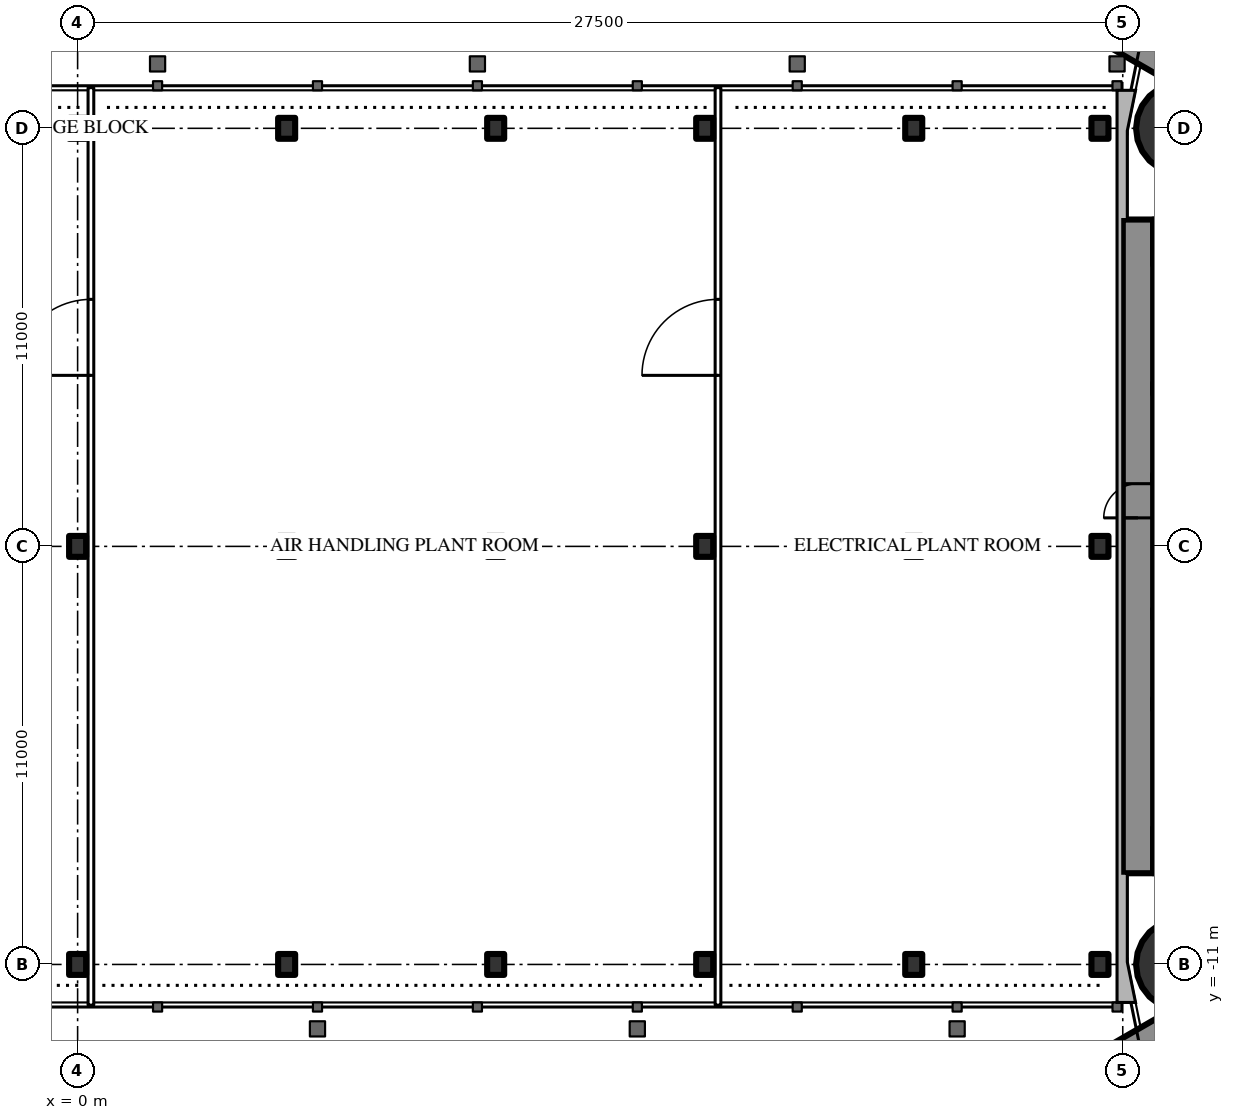
"""IFC4 building model, lengths in metres.
Left out: names, types, materials, properties, quantities, classifications, styles, units other than length and angle.
Written with IfcOpenShell. Run it as: python <this file> out.ifc"""

import sys

from ifc_helpers import new_model, si_unit, direction, frame, frame_2d, origin, origin_2d, place, context, subcontext, project, spatial, rectangle, circle, i_section, extrude, element, fill, save


model = new_model("IFC4")
c1 = context("Model", 3, precision=1e-05, world=origin(), true_north=direction((0.0, 1.0)))
c2 = subcontext(c1, "Body", "Model", "MODEL_VIEW")
j1 = project(units=[si_unit("LENGTHUNIT", "METRE"), si_unit("PLANEANGLEUNIT", "RADIAN")], contexts=[c1])
p1 = place(None, origin())
s1 = spatial("IfcSite", under=j1, at=p1, CompositionType="ELEMENT")
p2 = place(p1, origin())
s2 = spatial("IfcBuilding", under=s1, at=p2, CompositionType="ELEMENT")
p3 = place(p2, frame((0.0, 0.0, 251.9)))
s3 = spatial("IfcBuildingStorey", under=s2, at=p3, CompositionType="ELEMENT", Elevation=251.9)
for number, where, z_axis, x_axis in (
    (1, (29.05, 11.0, 0.0), (0.0, 0.0, 1.0), (1.0, 0.0, 0.0)),
    (2, (29.05, -11.0, 0.0), (0.0, 0.0, 1.0), (1.0, 0.0, 0.0)),
):
    element("IfcColumn", number, at=place(p3, frame(where, z_axis=z_axis, x_axis=x_axis)), inside=s3, PredefinedType="COLUMN", context=c2, shape_type="SweptSolid", body=[
        extrude(circle(Radius=1.2, at=origin_2d()), origin(), (0.0, 0.0, 1.0), 5.4),
    ])
p4 = place(p3, frame((27.9, -8.6, 0.0), z_axis=(0.0, 0.0, 1.0), x_axis=(0.0, 1.0, 0.0)))
e3 = element("IfcWall", 3, at=p4, inside=s3, PredefinedType="SHEAR", context=c2, shape_type="SweptSolid", body=[
    extrude(rectangle(XDim=17.2, YDim=0.8, at=frame_2d((8.6, 0.0))), origin(), (0.0, 0.0, 1.0), 5.4),
])
p5 = place(p4, frame((9.35, 0.0, 0.0)))
e4 = element("IfcOpeningElement", 4, at=p5, cuts=e3, PredefinedType="OPENING", context=c2, shape_type="SweptSolid", body=[
    extrude(rectangle(XDim=0.9, YDim=2.2, at=frame_2d((0.45, 1.1))), frame((0.0, 0.41, 0.0), z_axis=(0.0, -1.0, 0.0), x_axis=(1.0, 0.0, 0.0)), (0.0, 0.0, 1.0), 0.82),
])
p6 = place(p3, frame((28.3, -8.0, 0.0), z_axis=(0.0, 0.0, 1.0), x_axis=(1.0, 0.0, 0.0)))
e5 = element("IfcWall", 5, at=p6, inside=s3, PredefinedType="SHEAR", context=c2, shape_type="SweptSolid", body=[
    extrude(rectangle(XDim=8.4, YDim=1.2, at=frame_2d((4.2, 0.0))), origin(), (0.0, 0.0, 1.0), 5.4),
])
p7 = place(p6, frame((0.25, 0.0, 0.0)))
e6 = element("IfcOpeningElement", 6, at=p7, cuts=e5, PredefinedType="OPENING", context=c2, shape_type="SweptSolid", body=[
    extrude(rectangle(XDim=1.0, YDim=2.2, at=frame_2d((0.5, 1.1))), frame((0.0, 0.61, 0.0), z_axis=(0.0, -1.0, 0.0), x_axis=(1.0, 0.0, 0.0)), (0.0, 0.0, 1.0), 1.22),
])
p8 = place(p3, frame((28.3, 8.0, 0.0), z_axis=(0.0, 0.0, 1.0), x_axis=(1.0, 0.0, 0.0)))
e7 = element("IfcWall", 7, at=p8, inside=s3, PredefinedType="SHEAR", context=c2, shape_type="SweptSolid", body=[
    extrude(rectangle(XDim=8.4, YDim=1.2, at=frame_2d((4.2, 0.0))), origin(), (0.0, 0.0, 1.0), 5.4),
])
p9 = place(p8, frame((0.25, 0.0, 0.0)))
e8 = element("IfcOpeningElement", 8, at=p9, cuts=e7, PredefinedType="OPENING", context=c2, shape_type="SweptSolid", body=[
    extrude(rectangle(XDim=1.0, YDim=2.2, at=frame_2d((0.5, 1.1))), frame((0.0, 0.61, 0.0), z_axis=(0.0, -1.0, 0.0), x_axis=(1.0, 0.0, 0.0)), (0.0, 0.0, 1.0), 1.22),
])
for number, where, z_axis, x_axis in (
    (9, (28.3, -4.15, 0.0), (0.0, 0.0, 1.0), (1.0, 0.0, 0.0)),
    (10, (28.3, 4.15, 0.0), (0.0, 0.0, 1.0), (1.0, 0.0, 0.0)),
):
    element("IfcWall", number, at=place(p3, frame(where, z_axis=z_axis, x_axis=x_axis)), inside=s3, PredefinedType="SHEAR", context=c2, shape_type="SweptSolid", body=[
        extrude(rectangle(XDim=8.4, YDim=0.3, at=frame_2d((4.2, 0.0))), origin(), (0.0, 0.0, 1.0), 5.4),
    ])
for number, where, z_axis, x_axis in (
    (11, (28.3, -1.775, 0.0), (0.0, 0.0, 1.0), (1.0, 0.0, 0.0)),
    (12, (28.3, 1.775, 0.0), (0.0, 0.0, 1.0), (1.0, 0.0, 0.0)),
):
    element("IfcWall", number, at=place(p3, frame(where, z_axis=z_axis, x_axis=x_axis)), inside=s3, PredefinedType="SHEAR", context=c2, shape_type="SweptSolid", body=[
        extrude(rectangle(XDim=2.9, YDim=0.25, at=frame_2d((1.45, 0.0))), origin(), (0.0, 0.0, 1.0), 5.4),
    ])
p10 = place(p3, frame((27.2, -13.8, 0.0), z_axis=(0.0, 0.0, 1.0), x_axis=(0.866027159892, 0.499996958321, 0.0)))
e13 = element("IfcWall", 13, at=p10, inside=s3, PredefinedType="SHEAR", context=c2, shape_type="SweptSolid", body=[
    extrude(rectangle(XDim=27.947, YDim=1.2, at=frame_2d((13.973, 0.0))), origin(), (0.0, 0.0, 1.0), 5.4),
])
p11 = place(p10, frame((4.6, 0.0, 0.0)))
e14 = element("IfcOpeningElement", 14, at=p11, cuts=e13, PredefinedType="OPENING", context=c2, shape_type="SweptSolid", body=[
    extrude(rectangle(XDim=1.0, YDim=2.2, at=frame_2d((0.5, 1.1))), frame((0.0, 0.61, 0.0), z_axis=(0.0, -1.0, 0.0), x_axis=(1.0, 0.0, 0.0)), (0.0, 0.0, 1.0), 1.22),
])
p12 = place(p10, frame((13.395, 0.0, 0.0)))
e15 = element("IfcOpeningElement", 15, at=p12, cuts=e13, PredefinedType="OPENING", context=c2, shape_type="SweptSolid", body=[
    extrude(rectangle(XDim=1.8, YDim=2.2, at=frame_2d((0.9, 1.1))), frame((0.0, 0.61, 0.0), z_axis=(0.0, -1.0, 0.0), x_axis=(1.0, 0.0, 0.0)), (0.0, 0.0, 1.0), 1.22),
])
p13 = place(p3, frame((27.2, 13.8, 0.0), z_axis=(0.0, 0.0, 1.0), x_axis=(0.866024515034, -0.500001539357, 0.0)))
e16 = element("IfcWall", 16, at=p13, inside=s3, PredefinedType="SHEAR", context=c2, shape_type="SweptSolid", body=[
    extrude(rectangle(XDim=26.907, YDim=1.2, at=frame_2d((13.454, 0.0))), origin(), (0.0, 0.0, 1.0), 5.4),
])
p14 = place(p13, frame((4.6, 0.0, 0.0)))
e17 = element("IfcOpeningElement", 17, at=p14, cuts=e16, PredefinedType="OPENING", context=c2, shape_type="SweptSolid", body=[
    extrude(rectangle(XDim=1.0, YDim=2.2, at=frame_2d((0.5, 1.1))), frame((0.0, 0.61, 0.0), z_axis=(0.0, -1.0, 0.0), x_axis=(1.0, 0.0, 0.0)), (0.0, 0.0, 1.0), 1.22),
])
p15 = place(p13, frame((13.395, 0.0, 0.0)))
e18 = element("IfcOpeningElement", 18, at=p15, cuts=e16, PredefinedType="OPENING", context=c2, shape_type="SweptSolid", body=[
    extrude(rectangle(XDim=1.8, YDim=2.2, at=frame_2d((0.9, 1.1))), frame((0.0, 0.61, 0.0), z_axis=(0.0, -1.0, 0.0), x_axis=(1.0, 0.0, 0.0)), (0.0, 0.0, 1.0), 1.22),
])
for number, where, z_axis, x_axis in (
    (19, (0.0, -11.0, 0.0), (0.0, 0.0, 1.0), (1.0, 0.0, 0.0)),
    (20, (5.5, -11.0, 0.0), (0.0, 0.0, 1.0), (1.0, 0.0, 0.0)),
    (21, (11.0, -11.0, 0.0), (0.0, 0.0, 1.0), (1.0, 0.0, 0.0)),
    (22, (16.5, -11.0, 0.0), (0.0, 0.0, 1.0), (1.0, 0.0, 0.0)),
    (23, (22.0, -11.0, 0.0), (0.0, 0.0, 1.0), (1.0, 0.0, 0.0)),
    (24, (26.9, -11.0, 0.0), (0.0, 0.0, 1.0), (1.0, 0.0, 0.0)),
    (25, (0.0, 0.0, 0.0), (0.0, 0.0, 1.0), (1.0, 0.0, 0.0)),
    (26, (5.5, 0.0, 0.0), (0.0, 0.0, 1.0), (1.0, 0.0, 0.0)),
    (27, (11.0, 0.0, 0.0), (0.0, 0.0, 1.0), (1.0, 0.0, 0.0)),
    (28, (16.5, 0.0, 0.0), (0.0, 0.0, 1.0), (1.0, 0.0, 0.0)),
    (29, (22.0, 0.0, 0.0), (0.0, 0.0, 1.0), (1.0, 0.0, 0.0)),
    (30, (26.9, 0.0, 0.0), (0.0, 0.0, 1.0), (1.0, 0.0, 0.0)),
    (31, (0.0, 11.0, 0.0), (0.0, 0.0, 1.0), (1.0, 0.0, 0.0)),
    (32, (5.5, 11.0, 0.0), (0.0, 0.0, 1.0), (1.0, 0.0, 0.0)),
    (33, (11.0, 11.0, 0.0), (0.0, 0.0, 1.0), (1.0, 0.0, 0.0)),
    (34, (16.5, 11.0, 0.0), (0.0, 0.0, 1.0), (1.0, 0.0, 0.0)),
    (35, (22.0, 11.0, 0.0), (0.0, 0.0, 1.0), (1.0, 0.0, 0.0)),
    (36, (26.9, 11.0, 0.0), (0.0, 0.0, 1.0), (1.0, 0.0, 0.0)),
):
    element("IfcColumn", number, at=place(p3, frame(where, z_axis=z_axis, x_axis=x_axis)), inside=s3, PredefinedType="COLUMN", context=c2, shape_type="SweptSolid", body=[
        extrude(i_section(OverallWidth=0.448, OverallDepth=0.55, WebThickness=0.072, FlangeThickness=0.115, FilletRadius=0.02, at=origin_2d()), origin(), (0.0, 0.0, 1.0), 5.4),
    ])
p16 = place(p3, frame((0.35, -12.07, 0.0), z_axis=(0.0, 0.0, 1.0), x_axis=(0.0, 1.0, 0.0)))
e37 = element("IfcWall", 37, at=p16, inside=s3, PredefinedType="PARTITIONING", context=c2, shape_type="SweptSolid", body=[
    extrude(rectangle(XDim=24.14, YDim=0.15, at=frame_2d((12.07, 0.0))), origin(), (0.0, 0.0, 1.0), 5.2),
])
p17 = place(p16, frame((16.57, 0.0, 0.0)))
e38 = element("IfcOpeningElement", 38, at=p17, cuts=e37, PredefinedType="OPENING", context=c2, shape_type="SweptSolid", body=[
    extrude(rectangle(XDim=2.0, YDim=2.4, at=frame_2d((1.0, 1.2))), frame((0.0, 0.085, 0.0), z_axis=(0.0, -1.0, 0.0), x_axis=(1.0, 0.0, 0.0)), (0.0, 0.0, 1.0), 0.17),
])
p18 = place(p3, frame((16.85, -12.07, 0.0), z_axis=(0.0, 0.0, 1.0), x_axis=(0.0, 1.0, 0.0)))
e39 = element("IfcWall", 39, at=p18, inside=s3, PredefinedType="PARTITIONING", context=c2, shape_type="SweptSolid", body=[
    extrude(rectangle(XDim=24.14, YDim=0.15, at=frame_2d((12.07, 0.0))), origin(), (0.0, 0.0, 1.0), 5.2),
])
p19 = place(p18, frame((16.57, 0.0, 0.0)))
e40 = element("IfcOpeningElement", 40, at=p19, cuts=e39, PredefinedType="OPENING", context=c2, shape_type="SweptSolid", body=[
    extrude(rectangle(XDim=2.0, YDim=2.4, at=frame_2d((1.0, 1.2))), frame((0.0, 0.085, 0.0), z_axis=(0.0, -1.0, 0.0), x_axis=(1.0, 0.0, 0.0)), (0.0, 0.0, 1.0), 0.17),
])
p20 = place(p5, origin())
e41 = element("IfcDoor", 41, at=p20, inside=s3, OperationType="SINGLE_SWING_LEFT", PredefinedType="DOOR", context=c2, shape_type="SweptSolid", body=[
    extrude(rectangle(XDim=0.9, YDim=2.2, at=frame_2d((0.45, 1.1))), frame((0.0, 0.025, 0.0), z_axis=(0.0, -1.0, 0.0), x_axis=(1.0, 0.0, 0.0)), (0.0, 0.0, 1.0), 0.05),
])
fill(e4, e41)
p21 = place(p17, origin())
e42 = element("IfcDoor", 42, at=p21, inside=s3, OperationType="DOUBLE_DOOR_SINGLE_SWING", PredefinedType="DOOR", context=c2, shape_type="SweptSolid", body=[
    extrude(rectangle(XDim=2.0, YDim=2.4, at=frame_2d((1.0, 1.2))), frame((0.0, 0.025, 0.0), z_axis=(0.0, -1.0, 0.0), x_axis=(1.0, 0.0, 0.0)), (0.0, 0.0, 1.0), 0.05),
])
fill(e38, e42)
p22 = place(p19, origin())
e43 = element("IfcDoor", 43, at=p22, inside=s3, OperationType="DOUBLE_DOOR_SINGLE_SWING", PredefinedType="DOOR", context=c2, shape_type="SweptSolid", body=[
    extrude(rectangle(XDim=2.0, YDim=2.4, at=frame_2d((1.0, 1.2))), frame((0.0, 0.025, 0.0), z_axis=(0.0, -1.0, 0.0), x_axis=(1.0, 0.0, 0.0)), (0.0, 0.0, 1.0), 0.05),
])
fill(e40, e43)
save(model, sys.argv[1])
